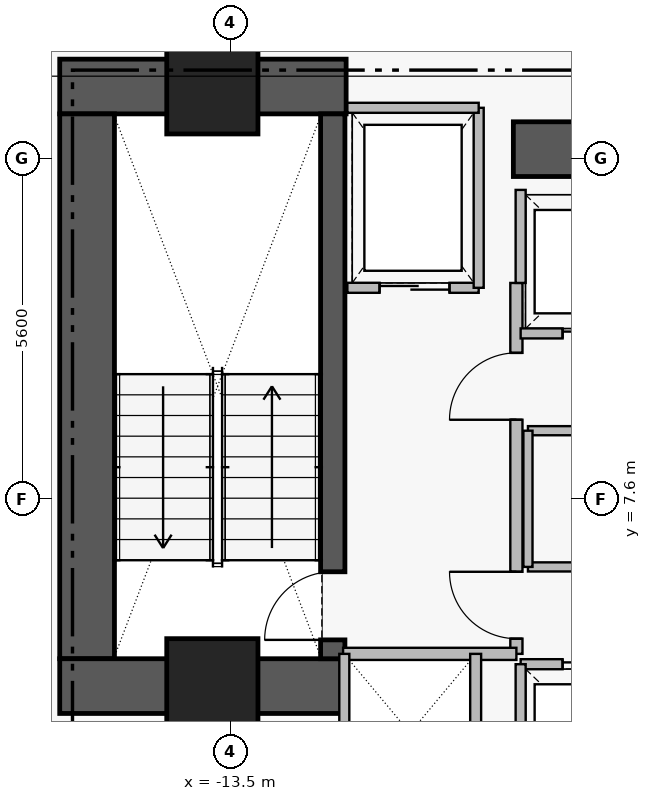
"""IFC4 building model, lengths in metres.
Left out: names, types, materials, properties, quantities, classifications, styles, units other than length and angle.
Written with IfcOpenShell. Run it as: python <this file> out.ifc"""

import sys

from ifc_helpers import new_model, si_unit, direction, frame, frame_2d, origin, origin_2d, place, context, subcontext, project, spatial, rectangle, extrude, element, fill, save


model = new_model("IFC4")
c1 = context("Model", 3, precision=1e-05, world=origin(), true_north=direction((0.0, 1.0)))
c2 = subcontext(c1, "Body", "Model", "MODEL_VIEW")
j1 = project(units=[si_unit("LENGTHUNIT", "METRE"), si_unit("PLANEANGLEUNIT", "RADIAN")], contexts=[c1])
p1 = place(None, origin())
s1 = spatial("IfcSite", under=j1, at=p1, CompositionType="ELEMENT")
p2 = place(p1, origin())
s2 = spatial("IfcBuilding", under=s1, at=p2, CompositionType="ELEMENT")
p3 = place(p2, frame((0.0, 0.0, 60.45)))
s3 = spatial("IfcBuildingStorey", under=s2, at=p3, CompositionType="ELEMENT", Elevation=60.45)
p4 = place(p3, frame((-16.31, 14.38, 0.0), z_axis=(0.0, 0.0, 1.0), x_axis=(1.0, 0.0, 0.0)))
e1 = element("IfcWall", 1, at=p4, inside=s3, PredefinedType="SHEAR", context=c2, shape_type="SweptSolid", body=[
    extrude(rectangle(XDim=4.71, YDim=0.9, at=frame_2d((2.355, 0.0))), origin(), (0.0, 0.0, 1.0), 3.46),
])
p5 = place(p3, frame((-15.86, 4.97, 0.0), z_axis=(0.0, 0.0, 1.0), x_axis=(0.0, 1.0, 0.0)))
e2 = element("IfcWall", 2, at=p5, inside=s3, PredefinedType="SHEAR", context=c2, shape_type="SweptSolid", body=[
    extrude(rectangle(XDim=8.96, YDim=0.9, at=frame_2d((4.48, 0.0))), origin(), (0.0, 0.0, 1.0), 3.46),
])
p6 = place(p3, frame((-16.31, 4.52, 0.0), z_axis=(0.0, 0.0, 1.0), x_axis=(1.0, 0.0, 0.0)))
e3 = element("IfcWall", 3, at=p6, inside=s3, PredefinedType="SHEAR", context=c2, shape_type="SweptSolid", body=[
    extrude(rectangle(XDim=4.71, YDim=0.9, at=frame_2d((2.355, 0.0))), origin(), (0.0, 0.0, 1.0), 3.46),
])
p7 = place(p3, frame((-8.85, 13.35, 0.0), z_axis=(0.0, 0.0, 1.0), x_axis=(1.0, 0.0, 0.0)))
e4 = element("IfcWall", 4, at=p7, inside=s3, PredefinedType="SHEAR", context=c2, shape_type="SweptSolid", body=[
    extrude(rectangle(XDim=7.6, YDim=0.9, at=frame_2d((3.8, 0.0))), origin(), (0.0, 0.0, 1.0), 3.43),
])
p8 = place(p3, frame((-11.82, 4.97, 0.0), z_axis=(0.0, 0.0, 1.0), x_axis=(0.0, 1.0, 0.0)))
e5 = element("IfcWall", 5, at=p8, inside=s3, PredefinedType="SHEAR", context=c2, shape_type="SweptSolid", body=[
    extrude(rectangle(XDim=8.96, YDim=0.4, at=frame_2d((4.48, 0.0))), origin(), (0.0, 0.0, 1.0), 3.46),
])
p9 = place(p8, frame((0.31, 0.0, 0.0)))
e6 = element("IfcOpeningElement", 6, at=p9, cuts=e5, PredefinedType="OPENING", context=c2, shape_type="SweptSolid", body=[
    extrude(rectangle(XDim=1.12, YDim=2.22, at=frame_2d((0.56, 1.11))), frame((0.0, 0.21, 0.0), z_axis=(0.0, -1.0, 0.0), x_axis=(1.0, 0.0, 0.0)), (0.0, 0.0, 1.0), 0.42),
])
for number, where, z_axis, x_axis in (
    (7, (-13.8, 14.35, 0.0), (0.0, 0.0, 1.0), (1.0, 0.0, 0.0)),
    (8, (-13.8, 4.55, 0.0), (0.0, 0.0, 1.0), (1.0, 0.0, 0.0)),
):
    element("IfcColumn", number, at=place(p3, frame(where, z_axis=z_axis, x_axis=x_axis)), inside=s3, PredefinedType="COLUMN", context=c2, shape_type="SweptSolid", body=[
        extrude(rectangle(XDim=1.5, YDim=1.5, at=origin_2d()), origin(), (0.0, 0.0, 1.0), 3.65),
    ])
p10 = place(p3, frame((-8.8, 5.05, 0.0), z_axis=(0.0, 0.0, 1.0), x_axis=(0.0, 1.0, 0.0)))
e9 = element("IfcWall", 9, at=p10, inside=s3, PredefinedType="PARTITIONING", context=c2, shape_type="SweptSolid", body=[
    extrude(rectangle(XDim=6.1, YDim=0.2, at=frame_2d((3.05, 0.0))), origin(), (0.0, 0.0, 1.0), 3.43),
])
p11 = place(p10, frame((0.25, 0.0, 0.0)))
e10 = element("IfcOpeningElement", 10, at=p11, cuts=e9, PredefinedType="OPENING", context=c2, shape_type="SweptSolid", body=[
    extrude(rectangle(XDim=1.1, YDim=2.2, at=frame_2d((0.55, 1.1))), frame((0.0, 0.11, 0.0), z_axis=(0.0, -1.0, 0.0), x_axis=(1.0, 0.0, 0.0)), (0.0, 0.0, 1.0), 0.22),
])
p12 = place(p10, frame((3.85, 0.0, 0.0)))
e11 = element("IfcOpeningElement", 11, at=p12, cuts=e9, PredefinedType="OPENING", context=c2, shape_type="SweptSolid", body=[
    extrude(rectangle(XDim=1.1, YDim=2.2, at=frame_2d((0.55, 1.1))), frame((0.0, 0.11, 0.0), z_axis=(0.0, -1.0, 0.0), x_axis=(1.0, 0.0, 0.0)), (0.0, 0.0, 1.0), 0.22),
])
p13 = place(p3, frame((-11.58, 11.07, 0.0), z_axis=(0.0, 0.0, 1.0), x_axis=(1.0, 0.0, 0.0)))
e12 = element("IfcWall", 12, at=p13, inside=s3, PredefinedType="PARTITIONING", context=c2, shape_type="SweptSolid", body=[
    extrude(rectangle(XDim=2.16, YDim=0.165, at=frame_2d((1.08, 0.0))), origin(), (0.0, 0.0, 1.0), 3.43),
])
p14 = place(p13, frame((0.53, 0.0, 0.0)))
e13 = element("IfcOpeningElement", 13, at=p14, cuts=e12, PredefinedType="OPENING", context=c2, shape_type="SweptSolid", body=[
    extrude(rectangle(XDim=1.15, YDim=2.25, at=frame_2d((0.575, 1.125))), frame((0.0, 0.093, 0.0), z_axis=(0.0, -1.0, 0.0), x_axis=(1.0, 0.0, 0.0)), (0.0, 0.0, 1.0), 0.185),
])
p15 = place(p3, frame((-8.73, 4.88, 0.0), z_axis=(0.0, 0.0, 1.0), x_axis=(1.0, 0.0, 0.0)))
e14 = element("IfcWall", 14, at=p15, inside=s3, PredefinedType="PARTITIONING", context=c2, shape_type="SweptSolid", body=[
    extrude(rectangle(XDim=2.48, YDim=0.165, at=frame_2d((1.24, 0.0))), origin(), (0.0, 0.0, 1.0), 3.43),
])
p16 = place(p15, frame((0.69, 0.0, 0.0)))
e15 = element("IfcOpeningElement", 15, at=p16, cuts=e14, PredefinedType="OPENING", context=c2, shape_type="SweptSolid", body=[
    extrude(rectangle(XDim=1.1, YDim=2.25, at=frame_2d((0.55, 1.125))), frame((0.0, 0.093, 0.0), z_axis=(0.0, -1.0, 0.0), x_axis=(1.0, 0.0, 0.0)), (0.0, 0.0, 1.0), 0.185),
])
p17 = place(p3, frame((-8.73, 10.32, 0.0), z_axis=(0.0, 0.0, 1.0), x_axis=(1.0, 0.0, 0.0)))
e16 = element("IfcWall", 16, at=p17, inside=s3, PredefinedType="PARTITIONING", context=c2, shape_type="SweptSolid", body=[
    extrude(rectangle(XDim=2.48, YDim=0.165, at=frame_2d((1.24, 0.0))), origin(), (0.0, 0.0, 1.0), 3.43),
])
p18 = place(p17, frame((0.69, 0.0, 0.0)))
e17 = element("IfcOpeningElement", 17, at=p18, cuts=e16, PredefinedType="OPENING", context=c2, shape_type="SweptSolid", body=[
    extrude(rectangle(XDim=1.1, YDim=2.25, at=frame_2d((0.55, 1.125))), frame((0.0, 0.093, 0.0), z_axis=(0.0, -1.0, 0.0), x_axis=(1.0, 0.0, 0.0)), (0.0, 0.0, 1.0), 0.185),
])
p19 = place(p3, frame((-8.61, 6.48, 0.0), z_axis=(0.0, 0.0, 1.0), x_axis=(1.0, 0.0, 0.0)))
e18 = element("IfcWall", 18, at=p19, inside=s3, PredefinedType="PARTITIONING", context=c2, shape_type="SweptSolid", body=[
    extrude(rectangle(XDim=7.29, YDim=0.15, at=frame_2d((3.645, 0.0))), origin(), (0.0, 0.0, 1.0), 3.43),
])
p20 = place(p19, frame((3.195, 0.0, 0.0)))
e19 = element("IfcOpeningElement", 19, at=p20, cuts=e18, PredefinedType="OPENING", context=c2, shape_type="SweptSolid", body=[
    extrude(rectangle(XDim=0.9, YDim=2.15, at=frame_2d((0.45, 1.075))), frame((0.0, 0.085, 0.0), z_axis=(0.0, -1.0, 0.0), x_axis=(1.0, 0.0, 0.0)), (0.0, 0.0, 1.0), 0.17),
])
p21 = place(p3, frame((-11.65, 5.05, 0.0), z_axis=(0.0, 0.0, 1.0), x_axis=(1.0, 0.0, 0.0)))
e20 = element("IfcWall", 20, at=p21, inside=s3, PredefinedType="PARTITIONING", context=c2, shape_type="SweptSolid", body=[
    extrude(rectangle(XDim=2.85, YDim=0.2, at=frame_2d((1.425, 0.0))), origin(), (0.0, 0.0, 1.0), 3.43),
])
p22 = place(p3, frame((-9.42, 11.07, 0.0), z_axis=(0.0, 0.0, 1.0), x_axis=(0.0, 1.0, 0.0)))
e21 = element("IfcWall", 21, at=p22, inside=s3, PredefinedType="PARTITIONING", context=c2, shape_type="SweptSolid", body=[
    extrude(rectangle(XDim=2.96, YDim=0.165, at=frame_2d((1.48, 0.0))), origin(), (0.0, 0.0, 1.0), 3.43),
])
p23 = place(p3, frame((-11.58, 14.03, 0.0), z_axis=(0.0, 0.0, 1.0), x_axis=(1.0, 0.0, 0.0)))
e22 = element("IfcWall", 22, at=p23, inside=s3, PredefinedType="PARTITIONING", context=c2, shape_type="SweptSolid", body=[
    extrude(rectangle(XDim=2.16, YDim=0.165, at=frame_2d((1.08, 0.0))), origin(), (0.0, 0.0, 1.0), 3.43),
])
p24 = place(p3, frame((-8.73, 2.52, 0.0), z_axis=(0.0, 0.0, 1.0), x_axis=(0.0, 1.0, 0.0)))
e23 = element("IfcWall", 23, at=p24, inside=s3, PredefinedType="PARTITIONING", context=c2, shape_type="SweptSolid", body=[
    extrude(rectangle(XDim=2.36, YDim=0.165, at=frame_2d((1.18, 0.0))), origin(), (0.0, 0.0, 1.0), 3.43),
])
p25 = place(p3, frame((-8.73, 11.15, 0.0), z_axis=(0.0, 0.0, 1.0), x_axis=(0.0, 1.0, 0.0)))
e24 = element("IfcWall", 24, at=p25, inside=s3, PredefinedType="PARTITIONING", context=c2, shape_type="SweptSolid", body=[
    extrude(rectangle(XDim=1.53, YDim=0.165, at=frame_2d((0.765, 0.0))), origin(), (0.0, 0.0, 1.0), 3.43),
])
p26 = place(p3, frame((-9.47, 2.45, 0.0), z_axis=(0.0, 0.0, 1.0), x_axis=(0.0, 1.0, 0.0)))
e25 = element("IfcWall", 25, at=p26, inside=s3, PredefinedType="PARTITIONING", context=c2, shape_type="SweptSolid", body=[
    extrude(rectangle(XDim=2.6, YDim=0.18, at=frame_2d((1.3, 0.0))), origin(), (0.0, 0.0, 1.0), 3.43),
])
p27 = place(p3, frame((-11.63, 2.47, 0.0), z_axis=(0.0, 0.0, 1.0), x_axis=(0.0, 1.0, 0.0)))
e26 = element("IfcWall", 26, at=p27, inside=s3, PredefinedType="PARTITIONING", context=c2, shape_type="SweptSolid", body=[
    extrude(rectangle(XDim=2.58, YDim=0.165, at=frame_2d((1.29, 0.0))), origin(), (0.0, 0.0, 1.0), 3.43),
])
p28 = place(p3, frame((-8.61, 8.72, 0.0), z_axis=(0.0, 0.0, 1.0), x_axis=(1.0, 0.0, 0.0)))
e27 = element("IfcWall", 27, at=p28, inside=s3, PredefinedType="PARTITIONING", context=c2, shape_type="SweptSolid", body=[
    extrude(rectangle(XDim=7.29, YDim=0.15, at=frame_2d((3.645, 0.0))), origin(), (0.0, 0.0, 1.0), 3.43),
])
p29 = place(p3, frame((-8.61, 6.48, 0.0), z_axis=(0.0, 0.0, 1.0), x_axis=(0.0, 1.0, 0.0)))
e28 = element("IfcWall", 28, at=p29, inside=s3, PredefinedType="PARTITIONING", context=c2, shape_type="SweptSolid", body=[
    extrude(rectangle(XDim=2.24, YDim=0.15, at=frame_2d((1.12, 0.0))), origin(), (0.0, 0.0, 1.0), 3.43),
])
p30 = place(p9, origin())
e29 = element("IfcDoor", 29, at=p30, inside=s3, OperationType="SINGLE_SWING_LEFT", PredefinedType="DOOR", context=c2, shape_type="SweptSolid", body=[
    extrude(rectangle(XDim=1.12, YDim=2.22, at=frame_2d((0.56, 1.11))), frame((0.0, 0.025, 0.0), z_axis=(0.0, -1.0, 0.0), x_axis=(1.0, 0.0, 0.0)), (0.0, 0.0, 1.0), 0.05),
])
fill(e6, e29)
p31 = place(p11, origin())
e30 = element("IfcDoor", 30, at=p31, inside=s3, OperationType="SINGLE_SWING_RIGHT", PredefinedType="DOOR", context=c2, shape_type="SweptSolid", body=[
    extrude(rectangle(XDim=1.1, YDim=2.2, at=frame_2d((0.55, 1.1))), frame((0.0, 0.025, 0.0), z_axis=(0.0, -1.0, 0.0), x_axis=(1.0, 0.0, 0.0)), (0.0, 0.0, 1.0), 0.05),
])
fill(e10, e30)
p32 = place(p12, origin())
e31 = element("IfcDoor", 31, at=p32, inside=s3, OperationType="SINGLE_SWING_LEFT", PredefinedType="DOOR", context=c2, shape_type="SweptSolid", body=[
    extrude(rectangle(XDim=1.1, YDim=2.2, at=frame_2d((0.55, 1.1))), frame((0.0, 0.025, 0.0), z_axis=(0.0, -1.0, 0.0), x_axis=(1.0, 0.0, 0.0)), (0.0, 0.0, 1.0), 0.05),
])
fill(e11, e31)
p33 = place(p14, origin())
e32 = element("IfcDoor", 32, at=p33, inside=s3, OperationType="SLIDING_TO_LEFT", PredefinedType="DOOR", context=c2, shape_type="SweptSolid", body=[
    extrude(rectangle(XDim=1.15, YDim=2.25, at=frame_2d((0.575, 1.125))), frame((0.0, 0.025, 0.0), z_axis=(0.0, -1.0, 0.0), x_axis=(1.0, 0.0, 0.0)), (0.0, 0.0, 1.0), 0.05),
])
fill(e13, e32)
p34 = place(p16, origin())
e33 = element("IfcDoor", 33, at=p34, inside=s3, OperationType="SLIDING_TO_LEFT", PredefinedType="DOOR", context=c2, shape_type="SweptSolid", body=[
    extrude(rectangle(XDim=1.1, YDim=2.25, at=frame_2d((0.55, 1.125))), frame((0.0, 0.025, 0.0), z_axis=(0.0, -1.0, 0.0), x_axis=(1.0, 0.0, 0.0)), (0.0, 0.0, 1.0), 0.05),
])
fill(e15, e33)
p35 = place(p18, origin())
e34 = element("IfcDoor", 34, at=p35, inside=s3, OperationType="SLIDING_TO_LEFT", PredefinedType="DOOR", context=c2, shape_type="SweptSolid", body=[
    extrude(rectangle(XDim=1.1, YDim=2.25, at=frame_2d((0.55, 1.125))), frame((0.0, 0.025, 0.0), z_axis=(0.0, -1.0, 0.0), x_axis=(1.0, 0.0, 0.0)), (0.0, 0.0, 1.0), 0.05),
])
fill(e17, e34)
save(model, sys.argv[1])
